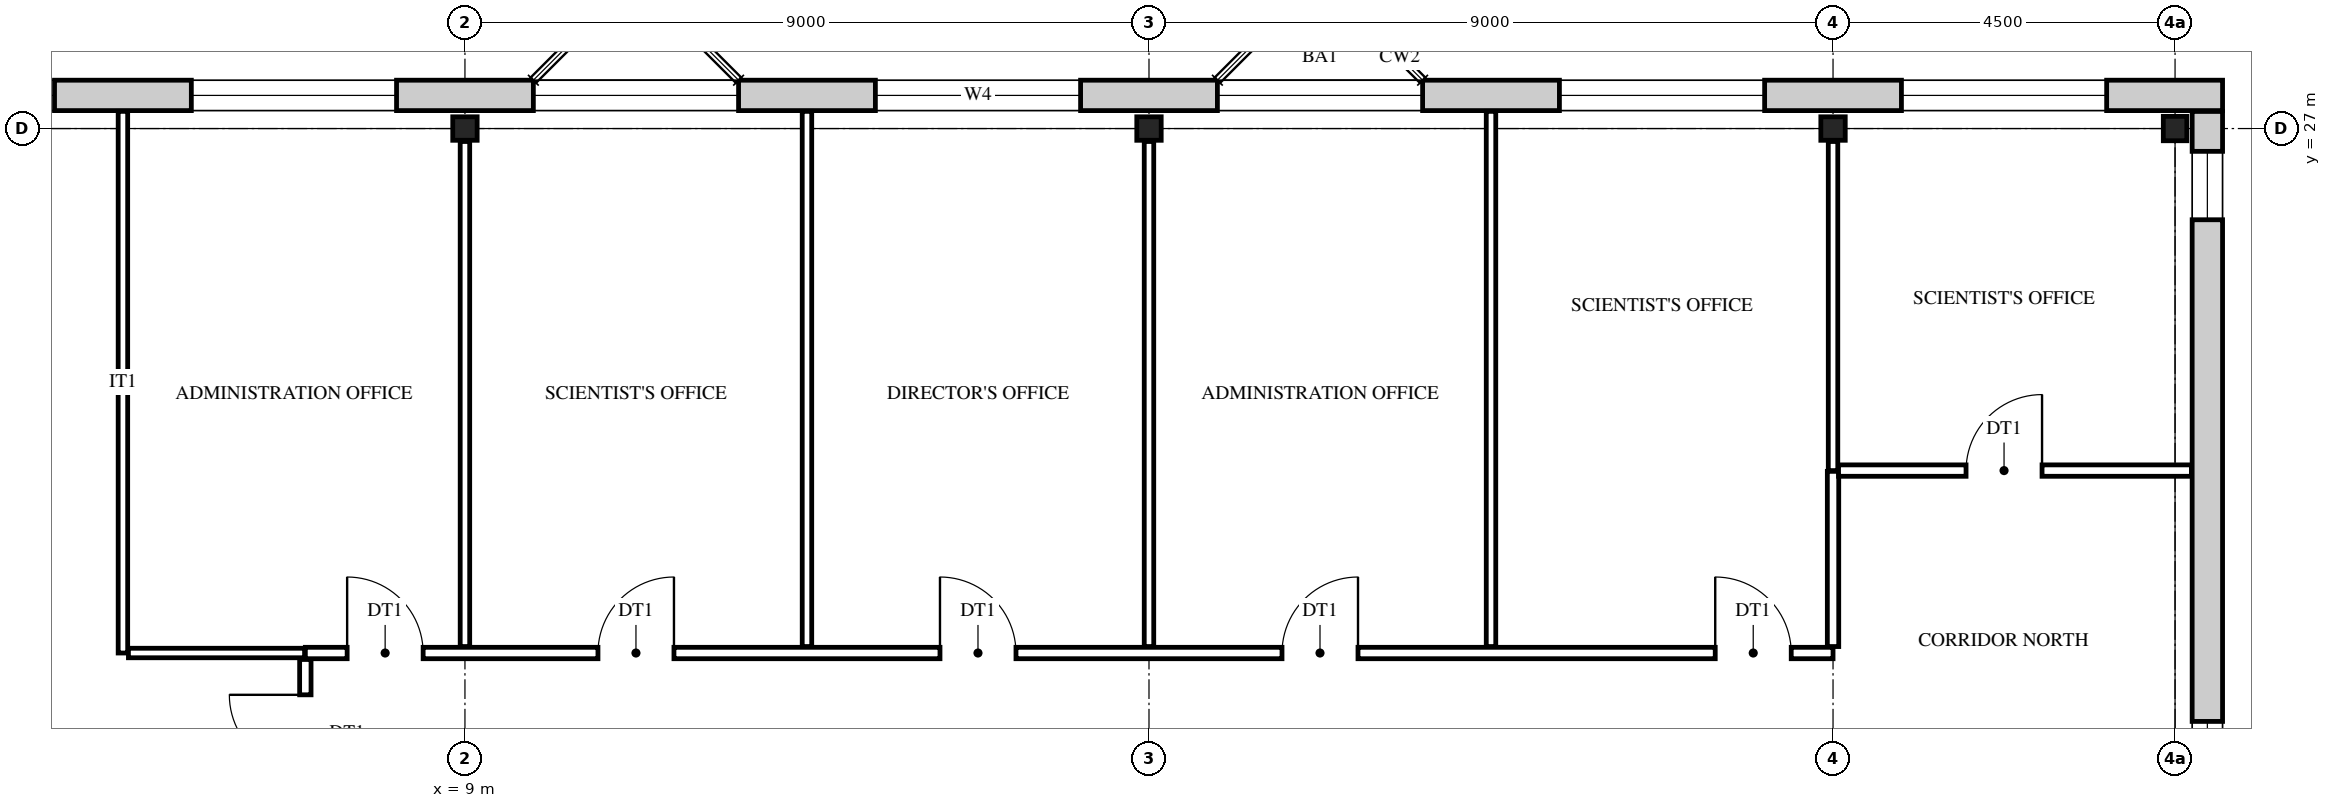
"""IFC4 building model, lengths in metres.
Left out: names, types, materials, properties, quantities, classifications, styles, units other than length and angle.
Written with IfcOpenShell. Run it as: python <this file> out.ifc"""

import sys

from ifc_helpers import new_model, si_unit, direction, frame, frame_2d, origin, origin_2d, place, context, subcontext, project, spatial, rectangle, i_section, extrude, element, fill, save


model = new_model("IFC4")
c1 = context("Model", 3, precision=1e-05, world=origin(), true_north=direction((0.0, 1.0)))
c2 = subcontext(c1, "Body", "Model", "MODEL_VIEW")
j1 = project(units=[si_unit("LENGTHUNIT", "METRE"), si_unit("PLANEANGLEUNIT", "RADIAN")], contexts=[c1])
p1 = place(None, origin())
s1 = spatial("IfcSite", under=j1, at=p1, CompositionType="ELEMENT")
p2 = place(p1, origin())
s2 = spatial("IfcBuilding", under=s1, at=p2, CompositionType="ELEMENT")
p3 = place(p2, frame((0.0, 0.0, 57.0)))
s3 = spatial("IfcBuildingStorey", under=s2, at=p3, CompositionType="ELEMENT", Elevation=57.0)
for number, where, z_axis, x_axis in (
    (1, (9.0, 27.0, 0.0), (0.0, 0.0, 1.0), (0.0, 1.0, 0.0)),
    (2, (18.0, 27.0, 0.0), (0.0, 0.0, 1.0), (0.0, 1.0, 0.0)),
    (3, (27.0, 27.0, 0.0), (0.0, 0.0, 1.0), (0.0, 1.0, 0.0)),
    (4, (31.5, 27.0, 0.0), (0.0, 0.0, 1.0), (1.0, 0.0, 0.0)),
):
    element("IfcColumn", number, at=place(p3, frame(where, z_axis=z_axis, x_axis=x_axis)), inside=s3, PredefinedType="COLUMN", context=c2, shape_type="SweptSolid", body=[
        extrude(i_section(OverallWidth=0.309, OverallDepth=0.321, WebThickness=0.014, FlangeThickness=0.022, FilletRadius=0.017, at=origin_2d()), origin(), (0.0, 0.0, 1.0), 4.2),
    ])
p4 = place(p3, frame((-0.625, 27.436, 0.0), z_axis=(0.0, 0.0, 1.0), x_axis=(1.0, 0.0, 0.0)))
e5 = element("IfcWall", 5, at=p4, inside=s3, PredefinedType="STANDARD", context=c2, shape_type="SweptSolid", body=[
    extrude(rectangle(XDim=32.75, YDim=0.4, at=frame_2d((16.375, 0.0))), origin(), (0.0, 0.0, 1.0), 4.2),
])
p5 = place(p4, frame((1.525, 0.0, 0.9)))
e6 = element("IfcOpeningElement", 6, at=p5, cuts=e5, PredefinedType="OPENING", context=c2, shape_type="SweptSolid", body=[
    extrude(rectangle(XDim=2.7, YDim=2.5, at=frame_2d((1.35, 1.25))), frame((0.0, 0.21, 0.0), z_axis=(0.0, -1.0, 0.0), x_axis=(1.0, 0.0, 0.0)), (0.0, 0.0, 1.0), 0.42),
])
p6 = place(p4, frame((6.025, 0.0, 0.9)))
e7 = element("IfcOpeningElement", 7, at=p6, cuts=e5, PredefinedType="OPENING", context=c2, shape_type="SweptSolid", body=[
    extrude(rectangle(XDim=2.7, YDim=2.5, at=frame_2d((1.35, 1.25))), frame((0.0, 0.21, 0.0), z_axis=(0.0, -1.0, 0.0), x_axis=(1.0, 0.0, 0.0)), (0.0, 0.0, 1.0), 0.42),
])
p7 = place(p4, frame((10.525, 0.0, 0.9)))
e8 = element("IfcOpeningElement", 8, at=p7, cuts=e5, PredefinedType="OPENING", context=c2, shape_type="SweptSolid", body=[
    extrude(rectangle(XDim=2.7, YDim=2.5, at=frame_2d((1.35, 1.25))), frame((0.0, 0.21, 0.0), z_axis=(0.0, -1.0, 0.0), x_axis=(1.0, 0.0, 0.0)), (0.0, 0.0, 1.0), 0.42),
])
p8 = place(p4, frame((15.025, 0.0, 0.9)))
e9 = element("IfcOpeningElement", 9, at=p8, cuts=e5, PredefinedType="OPENING", context=c2, shape_type="SweptSolid", body=[
    extrude(rectangle(XDim=2.7, YDim=2.5, at=frame_2d((1.35, 1.25))), frame((0.0, 0.21, 0.0), z_axis=(0.0, -1.0, 0.0), x_axis=(1.0, 0.0, 0.0)), (0.0, 0.0, 1.0), 0.42),
])
p9 = place(p4, frame((19.525, 0.0, 0.9)))
e10 = element("IfcOpeningElement", 10, at=p9, cuts=e5, PredefinedType="OPENING", context=c2, shape_type="SweptSolid", body=[
    extrude(rectangle(XDim=2.7, YDim=2.5, at=frame_2d((1.35, 1.25))), frame((0.0, 0.21, 0.0), z_axis=(0.0, -1.0, 0.0), x_axis=(1.0, 0.0, 0.0)), (0.0, 0.0, 1.0), 0.42),
])
p10 = place(p4, frame((24.025, 0.0, 0.9)))
e11 = element("IfcOpeningElement", 11, at=p10, cuts=e5, PredefinedType="OPENING", context=c2, shape_type="SweptSolid", body=[
    extrude(rectangle(XDim=2.7, YDim=2.5, at=frame_2d((1.35, 1.25))), frame((0.0, 0.21, 0.0), z_axis=(0.0, -1.0, 0.0), x_axis=(1.0, 0.0, 0.0)), (0.0, 0.0, 1.0), 0.42),
])
p11 = place(p4, frame((28.525, 0.0, 0.9)))
e12 = element("IfcOpeningElement", 12, at=p11, cuts=e5, PredefinedType="OPENING", context=c2, shape_type="SweptSolid", body=[
    extrude(rectangle(XDim=2.7, YDim=2.5, at=frame_2d((1.35, 1.25))), frame((0.0, 0.21, 0.0), z_axis=(0.0, -1.0, 0.0), x_axis=(1.0, 0.0, 0.0)), (0.0, 0.0, 1.0), 0.42),
])
p12 = place(p3, frame((31.925, 27.225, 0.0), z_axis=(0.0, 0.0, 1.0), x_axis=(0.0, -1.0, 0.0)))
e13 = element("IfcWall", 13, at=p12, inside=s3, PredefinedType="STANDARD", context=c2, shape_type="SweptSolid", body=[
    extrude(rectangle(XDim=27.45, YDim=0.4, at=frame_2d((13.725, 0.0))), origin(), (0.0, 0.0, 1.0), 4.2),
])
p13 = place(p12, frame((26.025, 0.0, 0.9)))
e14 = element("IfcOpeningElement", 14, at=p13, cuts=e13, PredefinedType="OPENING", context=c2, shape_type="SweptSolid", body=[
    extrude(rectangle(XDim=0.9, YDim=2.0, at=frame_2d((0.45, 1.0))), frame((0.0, 0.21, 0.0), z_axis=(0.0, -1.0, 0.0), x_axis=(1.0, 0.0, 0.0)), (0.0, 0.0, 1.0), 0.42),
])
p14 = place(p12, frame((18.525, 0.0, 0.9)))
e15 = element("IfcOpeningElement", 15, at=p14, cuts=e13, PredefinedType="OPENING", context=c2, shape_type="SweptSolid", body=[
    extrude(rectangle(XDim=0.9, YDim=2.0, at=frame_2d((0.45, 1.0))), frame((0.0, 0.21, 0.0), z_axis=(0.0, -1.0, 0.0), x_axis=(1.0, 0.0, 0.0)), (0.0, 0.0, 1.0), 0.42),
])
p15 = place(p12, frame((15.675, 0.0, 1.6)))
e16 = element("IfcOpeningElement", 16, at=p15, cuts=e13, PredefinedType="OPENING", context=c2, shape_type="SweptSolid", body=[
    extrude(rectangle(XDim=0.6, YDim=0.9, at=frame_2d((0.3, 0.45))), frame((0.0, 0.21, 0.0), z_axis=(0.0, -1.0, 0.0), x_axis=(1.0, 0.0, 0.0)), (0.0, 0.0, 1.0), 0.42),
])
p16 = place(p12, frame((11.175, 0.0, 1.6)))
e17 = element("IfcOpeningElement", 17, at=p16, cuts=e13, PredefinedType="OPENING", context=c2, shape_type="SweptSolid", body=[
    extrude(rectangle(XDim=0.6, YDim=0.9, at=frame_2d((0.3, 0.45))), frame((0.0, 0.21, 0.0), z_axis=(0.0, -1.0, 0.0), x_axis=(1.0, 0.0, 0.0)), (0.0, 0.0, 1.0), 0.42),
])
p17 = place(p12, frame((8.025, 0.0, 0.9)))
e18 = element("IfcOpeningElement", 18, at=p17, cuts=e13, PredefinedType="OPENING", context=c2, shape_type="SweptSolid", body=[
    extrude(rectangle(XDim=0.9, YDim=2.0, at=frame_2d((0.45, 1.0))), frame((0.0, 0.21, 0.0), z_axis=(0.0, -1.0, 0.0), x_axis=(1.0, 0.0, 0.0)), (0.0, 0.0, 1.0), 0.42),
])
p18 = place(p12, frame((0.525, 0.0, 0.9)))
e19 = element("IfcOpeningElement", 19, at=p18, cuts=e13, PredefinedType="OPENING", context=c2, shape_type="SweptSolid", body=[
    extrude(rectangle(XDim=0.9, YDim=2.0, at=frame_2d((0.45, 1.0))), frame((0.0, 0.21, 0.0), z_axis=(0.0, -1.0, 0.0), x_axis=(1.0, 0.0, 0.0)), (0.0, 0.0, 1.0), 0.42),
])
p19 = place(p3, frame((4.5, 20.1, 0.0), z_axis=(0.0, 0.0, 1.0), x_axis=(0.0, 1.0, 0.0)))
e20 = element("IfcWall", 20, at=p19, inside=s3, PredefinedType="PARTITIONING", context=c2, shape_type="SweptSolid", body=[
    extrude(rectangle(XDim=7.126, YDim=0.125, at=frame_2d((3.563, 0.0))), origin(), (0.0, 0.0, 1.0), 3.542),
])
p20 = place(p3, frame((6.9, 6.985, 0.0), z_axis=(0.0, 0.0, 1.0), x_axis=(0.0, 1.0, 0.0)))
e21 = element("IfcWall", 21, at=p20, inside=s3, PredefinedType="PARTITIONING", context=c2, shape_type="SweptSolid", body=[
    extrude(rectangle(XDim=13.03, YDim=0.15, at=frame_2d((6.515, 0.0))), origin(), (0.0, 0.0, 1.0), 3.542),
])
p21 = place(p20, frame((11.565, 0.0, 0.0)))
e22 = element("IfcOpeningElement", 22, at=p21, cuts=e21, PredefinedType="OPENING", context=c2, shape_type="SweptSolid", body=[
    extrude(rectangle(XDim=1.0, YDim=2.1, at=frame_2d((0.5, 1.05))), frame((0.0, 0.085, 0.0), z_axis=(0.0, -1.0, 0.0), x_axis=(1.0, 0.0, 0.0)), (0.0, 0.0, 1.0), 0.17),
])
p22 = place(p20, frame((3.765, 0.0, 0.0)))
e23 = element("IfcOpeningElement", 23, at=p22, cuts=e21, PredefinedType="OPENING", context=c2, shape_type="SweptSolid", body=[
    extrude(rectangle(XDim=1.0, YDim=2.1, at=frame_2d((0.5, 1.05))), frame((0.0, 0.085, 0.0), z_axis=(0.0, -1.0, 0.0), x_axis=(1.0, 0.0, 0.0)), (0.0, 0.0, 1.0), 0.17),
])
p23 = place(p20, frame((8.265, 0.0, 0.0)))
e24 = element("IfcOpeningElement", 24, at=p23, cuts=e21, PredefinedType="OPENING", context=c2, shape_type="SweptSolid", body=[
    extrude(rectangle(XDim=1.0, YDim=2.1, at=frame_2d((0.5, 1.05))), frame((0.0, 0.085, 0.0), z_axis=(0.0, -1.0, 0.0), x_axis=(1.0, 0.0, 0.0)), (0.0, 0.0, 1.0), 0.17),
])
p24 = place(p3, frame((9.0, 20.185, 0.0), z_axis=(0.0, 0.0, 1.0), x_axis=(0.0, 1.0, 0.0)))
e25 = element("IfcWall", 25, at=p24, inside=s3, PredefinedType="PARTITIONING", context=c2, shape_type="SweptSolid", body=[
    extrude(rectangle(XDim=6.645, YDim=0.125, at=frame_2d((3.322, 0.0))), origin(), (0.0, 0.0, 1.0), 3.542),
])
p25 = place(p3, frame((13.5, 20.185, 0.0), z_axis=(0.0, 0.0, 1.0), x_axis=(0.0, 1.0, 0.0)))
e26 = element("IfcWall", 26, at=p25, inside=s3, PredefinedType="PARTITIONING", context=c2, shape_type="SweptSolid", body=[
    extrude(rectangle(XDim=7.041, YDim=0.125, at=frame_2d((3.521, 0.0))), origin(), (0.0, 0.0, 1.0), 3.542),
])
p26 = place(p3, frame((18.0, 20.185, 0.0), z_axis=(0.0, 0.0, 1.0), x_axis=(0.0, 1.0, 0.0)))
e27 = element("IfcWall", 27, at=p26, inside=s3, PredefinedType="PARTITIONING", context=c2, shape_type="SweptSolid", body=[
    extrude(rectangle(XDim=6.645, YDim=0.125, at=frame_2d((3.322, 0.0))), origin(), (0.0, 0.0, 1.0), 3.542),
])
p27 = place(p3, frame((22.5, 20.185, 0.0), z_axis=(0.0, 0.0, 1.0), x_axis=(0.0, 1.0, 0.0)))
e28 = element("IfcWall", 28, at=p27, inside=s3, PredefinedType="PARTITIONING", context=c2, shape_type="SweptSolid", body=[
    extrude(rectangle(XDim=7.041, YDim=0.125, at=frame_2d((3.521, 0.0))), origin(), (0.0, 0.0, 1.0), 3.542),
])
p28 = place(p3, frame((27.0, 20.185, 0.0), z_axis=(0.0, 0.0, 1.0), x_axis=(0.0, 1.0, 0.0)))
e29 = element("IfcWall", 29, at=p28, inside=s3, PredefinedType="PARTITIONING", context=c2, shape_type="SweptSolid", body=[
    extrude(rectangle(XDim=2.305, YDim=0.15, at=frame_2d((1.152, 0.0))), origin(), (0.0, 0.0, 1.0), 3.542),
])
p29 = place(p3, frame((27.0, 22.5, 0.0), z_axis=(0.0, 0.0, 1.0), x_axis=(0.0, 1.0, 0.0)))
e30 = element("IfcWall", 30, at=p29, inside=s3, PredefinedType="PARTITIONING", context=c2, shape_type="SweptSolid", body=[
    extrude(rectangle(XDim=4.33, YDim=0.125, at=frame_2d((2.165, 0.0))), origin(), (0.0, 0.0, 1.0), 3.542),
])
p30 = place(p3, frame((4.573, 20.1, 0.0), z_axis=(0.0, 0.0, 1.0), x_axis=(1.0, 0.0, 0.0)))
e31 = element("IfcWall", 31, at=p30, inside=s3, PredefinedType="PARTITIONING", context=c2, shape_type="SweptSolid", body=[
    extrude(rectangle(XDim=2.317, YDim=0.125, at=frame_2d((1.159, 0.0))), origin(), (0.0, 0.0, 1.0), 3.542),
])
p31 = place(p3, frame((6.9, 20.1, 0.0), z_axis=(0.0, 0.0, 1.0), x_axis=(1.0, 0.0, 0.0)))
e32 = element("IfcWall", 32, at=p31, inside=s3, PredefinedType="PARTITIONING", context=c2, shape_type="SweptSolid", body=[
    extrude(rectangle(XDim=20.1, YDim=0.15, at=frame_2d((10.05, 0.0))), origin(), (0.0, 0.0, 1.0), 3.542),
])
p32 = place(p31, frame((0.55, 0.0, 0.0)))
e33 = element("IfcOpeningElement", 33, at=p32, cuts=e32, PredefinedType="OPENING", context=c2, shape_type="SweptSolid", body=[
    extrude(rectangle(XDim=1.0, YDim=2.1, at=frame_2d((0.5, 1.05))), frame((0.0, 0.085, 0.0), z_axis=(0.0, -1.0, 0.0), x_axis=(1.0, 0.0, 0.0)), (0.0, 0.0, 1.0), 0.17),
])
p33 = place(p31, frame((3.85, 0.0, 0.0)))
e34 = element("IfcOpeningElement", 34, at=p33, cuts=e32, PredefinedType="OPENING", context=c2, shape_type="SweptSolid", body=[
    extrude(rectangle(XDim=1.0, YDim=2.1, at=frame_2d((0.5, 1.05))), frame((0.0, 0.085, 0.0), z_axis=(0.0, -1.0, 0.0), x_axis=(1.0, 0.0, 0.0)), (0.0, 0.0, 1.0), 0.17),
])
p34 = place(p31, frame((8.35, 0.0, 0.0)))
e35 = element("IfcOpeningElement", 35, at=p34, cuts=e32, PredefinedType="OPENING", context=c2, shape_type="SweptSolid", body=[
    extrude(rectangle(XDim=1.0, YDim=2.1, at=frame_2d((0.5, 1.05))), frame((0.0, 0.085, 0.0), z_axis=(0.0, -1.0, 0.0), x_axis=(1.0, 0.0, 0.0)), (0.0, 0.0, 1.0), 0.17),
])
p35 = place(p31, frame((12.85, 0.0, 0.0)))
e36 = element("IfcOpeningElement", 36, at=p35, cuts=e32, PredefinedType="OPENING", context=c2, shape_type="SweptSolid", body=[
    extrude(rectangle(XDim=1.0, YDim=2.1, at=frame_2d((0.5, 1.05))), frame((0.0, 0.085, 0.0), z_axis=(0.0, -1.0, 0.0), x_axis=(1.0, 0.0, 0.0)), (0.0, 0.0, 1.0), 0.17),
])
p36 = place(p31, frame((18.55, 0.0, 0.0)))
e37 = element("IfcOpeningElement", 37, at=p36, cuts=e32, PredefinedType="OPENING", context=c2, shape_type="SweptSolid", body=[
    extrude(rectangle(XDim=1.0, YDim=2.1, at=frame_2d((0.5, 1.05))), frame((0.0, 0.085, 0.0), z_axis=(0.0, -1.0, 0.0), x_axis=(1.0, 0.0, 0.0)), (0.0, 0.0, 1.0), 0.17),
])
p37 = place(p3, frame((27.073, 22.5, 0.0), z_axis=(0.0, 0.0, 1.0), x_axis=(1.0, 0.0, 0.0)))
e38 = element("IfcWall", 38, at=p37, inside=s3, PredefinedType="PARTITIONING", context=c2, shape_type="SweptSolid", body=[
    extrude(rectangle(XDim=4.643, YDim=0.15, at=frame_2d((2.321, 0.0))), origin(), (0.0, 0.0, 1.0), 3.542),
])
p38 = place(p37, frame((1.677, 0.0, 0.0)))
e39 = element("IfcOpeningElement", 39, at=p38, cuts=e38, PredefinedType="OPENING", context=c2, shape_type="SweptSolid", body=[
    extrude(rectangle(XDim=1.0, YDim=2.1, at=frame_2d((0.5, 1.05))), frame((0.0, 0.085, 0.0), z_axis=(0.0, -1.0, 0.0), x_axis=(1.0, 0.0, 0.0)), (0.0, 0.0, 1.0), 0.17),
])
p39 = place(p5, origin())
e40 = element("IfcWindow", 40, at=p39, inside=s3, PartitioningType="SINGLE_PANEL", PredefinedType="WINDOW", context=c2, shape_type="SweptSolid", body=[
    extrude(rectangle(XDim=2.7, YDim=2.5, at=frame_2d((1.35, 1.25))), frame((0.0, 0.03, 0.0), z_axis=(0.0, -1.0, 0.0), x_axis=(1.0, 0.0, 0.0)), (0.0, 0.0, 1.0), 0.06),
])
fill(e6, e40)
p40 = place(p6, origin())
e41 = element("IfcWindow", 41, at=p40, inside=s3, PartitioningType="SINGLE_PANEL", PredefinedType="WINDOW", context=c2, shape_type="SweptSolid", body=[
    extrude(rectangle(XDim=2.7, YDim=2.5, at=frame_2d((1.35, 1.25))), frame((0.0, 0.03, 0.0), z_axis=(0.0, -1.0, 0.0), x_axis=(1.0, 0.0, 0.0)), (0.0, 0.0, 1.0), 0.06),
])
fill(e7, e41)
p41 = place(p7, origin())
e42 = element("IfcWindow", 42, at=p41, inside=s3, PartitioningType="SINGLE_PANEL", PredefinedType="WINDOW", context=c2, shape_type="SweptSolid", body=[
    extrude(rectangle(XDim=2.7, YDim=2.5, at=frame_2d((1.35, 1.25))), frame((0.0, 0.03, 0.0), z_axis=(0.0, -1.0, 0.0), x_axis=(1.0, 0.0, 0.0)), (0.0, 0.0, 1.0), 0.06),
])
fill(e8, e42)
p42 = place(p8, origin())
e43 = element("IfcWindow", 43, at=p42, inside=s3, PartitioningType="SINGLE_PANEL", PredefinedType="WINDOW", context=c2, shape_type="SweptSolid", body=[
    extrude(rectangle(XDim=2.7, YDim=2.5, at=frame_2d((1.35, 1.25))), frame((0.0, 0.03, 0.0), z_axis=(0.0, -1.0, 0.0), x_axis=(1.0, 0.0, 0.0)), (0.0, 0.0, 1.0), 0.06),
])
fill(e9, e43)
p43 = place(p9, origin())
e44 = element("IfcWindow", 44, at=p43, inside=s3, PartitioningType="SINGLE_PANEL", PredefinedType="WINDOW", context=c2, shape_type="SweptSolid", body=[
    extrude(rectangle(XDim=2.7, YDim=2.5, at=frame_2d((1.35, 1.25))), frame((0.0, 0.03, 0.0), z_axis=(0.0, -1.0, 0.0), x_axis=(1.0, 0.0, 0.0)), (0.0, 0.0, 1.0), 0.06),
])
fill(e10, e44)
p44 = place(p10, origin())
e45 = element("IfcWindow", 45, at=p44, inside=s3, PartitioningType="SINGLE_PANEL", PredefinedType="WINDOW", context=c2, shape_type="SweptSolid", body=[
    extrude(rectangle(XDim=2.7, YDim=2.5, at=frame_2d((1.35, 1.25))), frame((0.0, 0.03, 0.0), z_axis=(0.0, -1.0, 0.0), x_axis=(1.0, 0.0, 0.0)), (0.0, 0.0, 1.0), 0.06),
])
fill(e11, e45)
p45 = place(p11, origin())
e46 = element("IfcWindow", 46, at=p45, inside=s3, PartitioningType="SINGLE_PANEL", PredefinedType="WINDOW", context=c2, shape_type="SweptSolid", body=[
    extrude(rectangle(XDim=2.7, YDim=2.5, at=frame_2d((1.35, 1.25))), frame((0.0, 0.03, 0.0), z_axis=(0.0, -1.0, 0.0), x_axis=(1.0, 0.0, 0.0)), (0.0, 0.0, 1.0), 0.06),
])
fill(e12, e46)
p46 = place(p17, origin())
e47 = element("IfcWindow", 47, at=p46, inside=s3, PartitioningType="SINGLE_PANEL", PredefinedType="WINDOW", context=c2, shape_type="SweptSolid", body=[
    extrude(rectangle(XDim=0.9, YDim=2.0, at=frame_2d((0.45, 1.0))), frame((0.0, 0.03, 0.0), z_axis=(0.0, -1.0, 0.0), x_axis=(1.0, 0.0, 0.0)), (0.0, 0.0, 1.0), 0.06),
])
fill(e18, e47)
p47 = place(p18, origin())
e48 = element("IfcWindow", 48, at=p47, inside=s3, PartitioningType="SINGLE_PANEL", PredefinedType="WINDOW", context=c2, shape_type="SweptSolid", body=[
    extrude(rectangle(XDim=0.9, YDim=2.0, at=frame_2d((0.45, 1.0))), frame((0.0, 0.03, 0.0), z_axis=(0.0, -1.0, 0.0), x_axis=(1.0, 0.0, 0.0)), (0.0, 0.0, 1.0), 0.06),
])
fill(e19, e48)
p48 = place(p21, origin())
e49 = element("IfcDoor", 49, at=p48, inside=s3, OperationType="SINGLE_SWING_RIGHT", PredefinedType="DOOR", context=c2, shape_type="SweptSolid", body=[
    extrude(rectangle(XDim=1.0, YDim=2.1, at=frame_2d((0.5, 1.05))), frame((0.0, 0.025, 0.0), z_axis=(0.0, -1.0, 0.0), x_axis=(1.0, 0.0, 0.0)), (0.0, 0.0, 1.0), 0.05),
])
fill(e22, e49)
p49 = place(p32, origin())
e50 = element("IfcDoor", 50, at=p49, inside=s3, OperationType="SINGLE_SWING_LEFT", PredefinedType="DOOR", context=c2, shape_type="SweptSolid", body=[
    extrude(rectangle(XDim=1.0, YDim=2.1, at=frame_2d((0.5, 1.05))), frame((0.0, 0.025, 0.0), z_axis=(0.0, -1.0, 0.0), x_axis=(1.0, 0.0, 0.0)), (0.0, 0.0, 1.0), 0.05),
])
fill(e33, e50)
p50 = place(p33, origin())
e51 = element("IfcDoor", 51, at=p50, inside=s3, OperationType="SINGLE_SWING_RIGHT", PredefinedType="DOOR", context=c2, shape_type="SweptSolid", body=[
    extrude(rectangle(XDim=1.0, YDim=2.1, at=frame_2d((0.5, 1.05))), frame((0.0, 0.025, 0.0), z_axis=(0.0, -1.0, 0.0), x_axis=(1.0, 0.0, 0.0)), (0.0, 0.0, 1.0), 0.05),
])
fill(e34, e51)
p51 = place(p34, origin())
e52 = element("IfcDoor", 52, at=p51, inside=s3, OperationType="SINGLE_SWING_LEFT", PredefinedType="DOOR", context=c2, shape_type="SweptSolid", body=[
    extrude(rectangle(XDim=1.0, YDim=2.1, at=frame_2d((0.5, 1.05))), frame((0.0, 0.025, 0.0), z_axis=(0.0, -1.0, 0.0), x_axis=(1.0, 0.0, 0.0)), (0.0, 0.0, 1.0), 0.05),
])
fill(e35, e52)
p52 = place(p35, origin())
e53 = element("IfcDoor", 53, at=p52, inside=s3, OperationType="SINGLE_SWING_RIGHT", PredefinedType="DOOR", context=c2, shape_type="SweptSolid", body=[
    extrude(rectangle(XDim=1.0, YDim=2.1, at=frame_2d((0.5, 1.05))), frame((0.0, 0.025, 0.0), z_axis=(0.0, -1.0, 0.0), x_axis=(1.0, 0.0, 0.0)), (0.0, 0.0, 1.0), 0.05),
])
fill(e36, e53)
p53 = place(p36, origin())
e54 = element("IfcDoor", 54, at=p53, inside=s3, OperationType="SINGLE_SWING_LEFT", PredefinedType="DOOR", context=c2, shape_type="SweptSolid", body=[
    extrude(rectangle(XDim=1.0, YDim=2.1, at=frame_2d((0.5, 1.05))), frame((0.0, 0.025, 0.0), z_axis=(0.0, -1.0, 0.0), x_axis=(1.0, 0.0, 0.0)), (0.0, 0.0, 1.0), 0.05),
])
fill(e37, e54)
p54 = place(p38, origin())
e55 = element("IfcDoor", 55, at=p54, inside=s3, OperationType="SINGLE_SWING_RIGHT", PredefinedType="DOOR", context=c2, shape_type="SweptSolid", body=[
    extrude(rectangle(XDim=1.0, YDim=2.1, at=frame_2d((0.5, 1.05))), frame((0.0, 0.025, 0.0), z_axis=(0.0, -1.0, 0.0), x_axis=(1.0, 0.0, 0.0)), (0.0, 0.0, 1.0), 0.05),
])
fill(e39, e55)
save(model, sys.argv[1])
